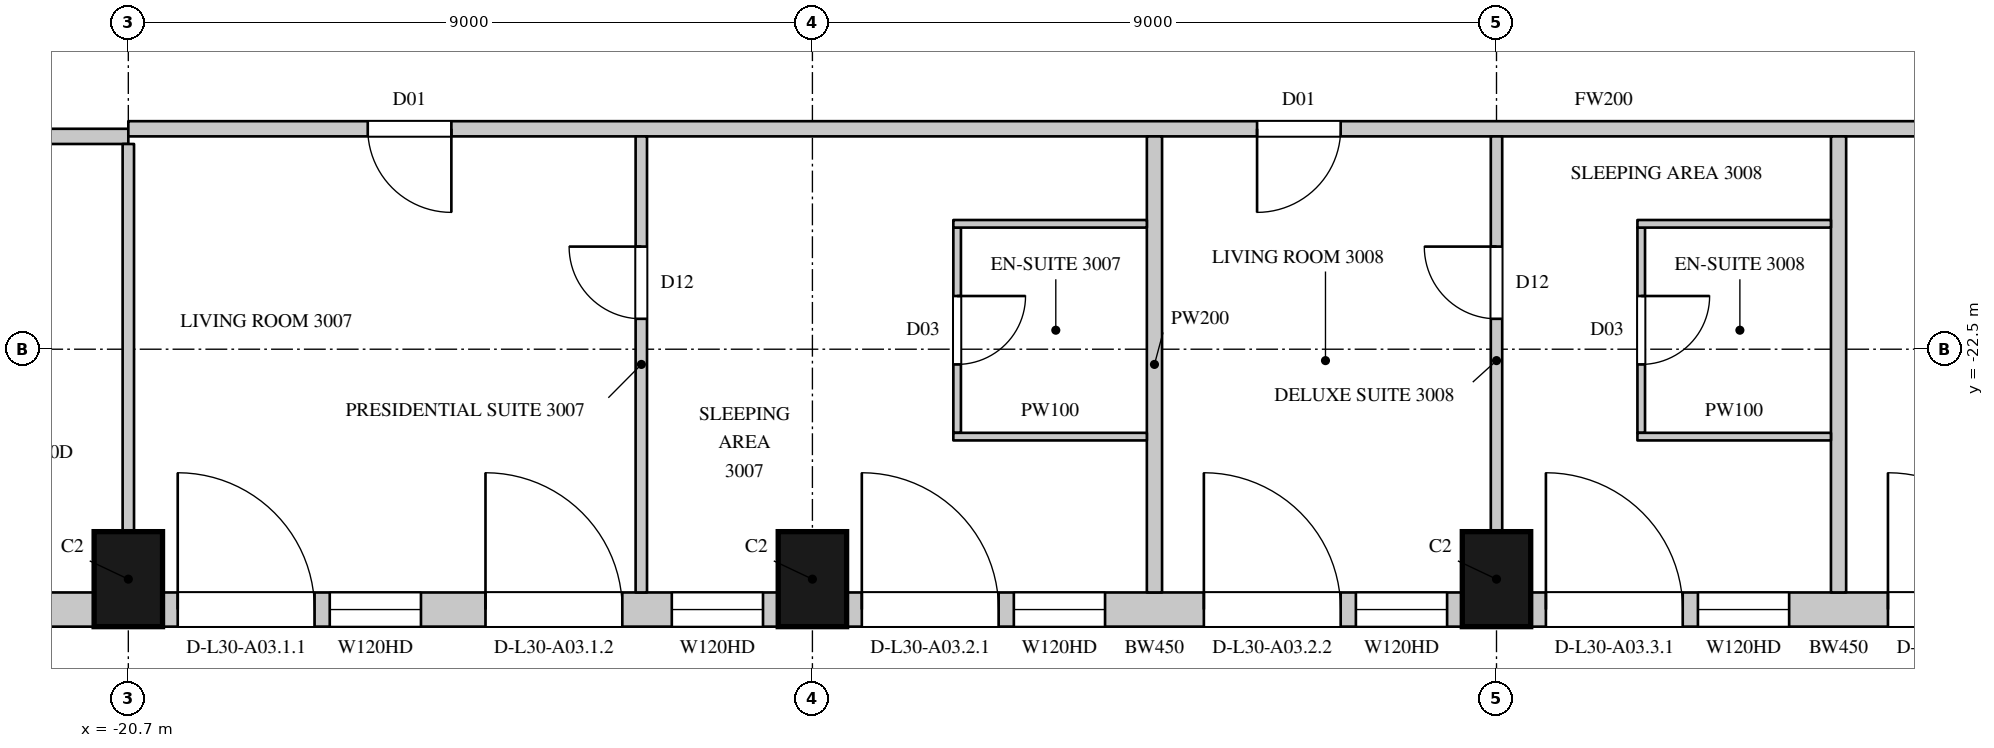
"""IFC4 building model, lengths in metres.
Left out: names, types, materials, properties, quantities, classifications, styles, units other than length and angle.
Written with IfcOpenShell. Run it as: python <this file> out.ifc"""

import sys

from ifc_helpers import new_model, si_unit, direction, frame, frame_2d, origin, origin_2d, place, context, subcontext, project, spatial, rectangle, extrude, element, fill, save


model = new_model("IFC4")
c1 = context("Model", 3, precision=1e-05, world=origin(), true_north=direction((0.0, 1.0)))
c2 = subcontext(c1, "Body", "Model", "MODEL_VIEW")
j1 = project(units=[si_unit("LENGTHUNIT", "METRE"), si_unit("PLANEANGLEUNIT", "RADIAN")], contexts=[c1])
p1 = place(None, origin())
s1 = spatial("IfcSite", under=j1, at=p1, CompositionType="ELEMENT")
p2 = place(p1, origin())
s2 = spatial("IfcBuilding", under=s1, at=p2, CompositionType="ELEMENT")
p3 = place(p2, frame((0.0, 0.0, 138.3)))
s3 = spatial("IfcBuildingStorey", under=s2, at=p3, CompositionType="ELEMENT", Elevation=138.3)
for number, where, z_axis, x_axis in (
    (1, (-20.7, -25.525, 0.0), (0.0, 0.0, 1.0), (1.0, 0.0, 0.0)),
    (2, (-11.7, -25.525, 0.0), (0.0, 0.0, 1.0), (1.0, 0.0, 0.0)),
    (3, (-2.7, -25.525, 0.0), (0.0, 0.0, 1.0), (1.0, 0.0, 0.0)),
):
    element("IfcColumn", number, at=place(p3, frame(where, z_axis=z_axis, x_axis=x_axis)), inside=s3, PredefinedType="COLUMN", context=c2, shape_type="SweptSolid", body=[
        extrude(rectangle(XDim=0.9, YDim=1.25, at=origin_2d()), origin(), (0.0, 0.0, 1.0), 3.6),
    ])
p4 = place(p3, frame((-24.064, -25.925, 0.0), z_axis=(0.0, 0.0, 1.0), x_axis=(1.0, 0.0, 0.0)))
e4 = element("IfcWall", 4, at=p4, inside=s3, PredefinedType="SOLIDWALL", context=c2, shape_type="SweptSolid", body=[
    extrude(rectangle(XDim=2.914, YDim=0.45, at=frame_2d((1.457, 0.0))), origin(), (0.0, 0.0, 1.0), 3.3),
])
p5 = place(p3, frame((-20.25, -25.925, 0.0), z_axis=(0.0, 0.0, 1.0), x_axis=(1.0, 0.0, 0.0)))
e5 = element("IfcWall", 5, at=p5, inside=s3, PredefinedType="SOLIDWALL", context=c2, shape_type="SweptSolid", body=[
    extrude(rectangle(XDim=8.1, YDim=0.45, at=frame_2d((4.05, 0.0))), origin(), (0.0, 0.0, 1.0), 3.3),
])
p6 = place(p5, frame((0.2, 0.0, 0.0)))
e6 = element("IfcOpeningElement", 6, at=p6, cuts=e5, PredefinedType="OPENING", context=c2, shape_type="SweptSolid", body=[
    extrude(rectangle(XDim=1.8, YDim=2.4, at=frame_2d((0.9, 1.2))), frame((0.0, 0.235, 0.0), z_axis=(0.0, -1.0, 0.0), x_axis=(1.0, 0.0, 0.0)), (0.0, 0.0, 1.0), 0.47),
])
p7 = place(p5, frame((2.2, 0.0, 1.05)))
e7 = element("IfcOpeningElement", 7, at=p7, cuts=e5, PredefinedType="OPENING", context=c2, shape_type="SweptSolid", body=[
    extrude(rectangle(XDim=1.2, YDim=2.0, at=frame_2d((0.6, 1.0))), frame((0.0, 0.235, 0.0), z_axis=(0.0, -1.0, 0.0), x_axis=(1.0, 0.0, 0.0)), (0.0, 0.0, 1.0), 0.47),
])
p8 = place(p5, frame((4.249, 0.0, 0.0)))
e8 = element("IfcOpeningElement", 8, at=p8, cuts=e5, PredefinedType="OPENING", context=c2, shape_type="SweptSolid", body=[
    extrude(rectangle(XDim=1.8, YDim=2.4, at=frame_2d((0.9, 1.2))), frame((0.0, 0.235, 0.0), z_axis=(0.0, -1.0, 0.0), x_axis=(1.0, 0.0, 0.0)), (0.0, 0.0, 1.0), 0.47),
])
p9 = place(p5, frame((6.7, 0.0, 1.05)))
e9 = element("IfcOpeningElement", 9, at=p9, cuts=e5, PredefinedType="OPENING", context=c2, shape_type="SweptSolid", body=[
    extrude(rectangle(XDim=1.2, YDim=2.0, at=frame_2d((0.6, 1.0))), frame((0.0, 0.235, 0.0), z_axis=(0.0, -1.0, 0.0), x_axis=(1.0, 0.0, 0.0)), (0.0, 0.0, 1.0), 0.47),
])
p10 = place(p3, frame((-11.25, -25.925, 0.0), z_axis=(0.0, 0.0, 1.0), x_axis=(1.0, 0.0, 0.0)))
e10 = element("IfcWall", 10, at=p10, inside=s3, PredefinedType="SOLIDWALL", context=c2, shape_type="SweptSolid", body=[
    extrude(rectangle(XDim=8.1, YDim=0.45, at=frame_2d((4.05, 0.0))), origin(), (0.0, 0.0, 1.0), 3.3),
])
p11 = place(p10, frame((0.2, 0.0, 0.0)))
e11 = element("IfcOpeningElement", 11, at=p11, cuts=e10, PredefinedType="OPENING", context=c2, shape_type="SweptSolid", body=[
    extrude(rectangle(XDim=1.8, YDim=2.4, at=frame_2d((0.9, 1.2))), frame((0.0, 0.235, 0.0), z_axis=(0.0, -1.0, 0.0), x_axis=(1.0, 0.0, 0.0)), (0.0, 0.0, 1.0), 0.47),
])
p12 = place(p10, frame((2.2, 0.0, 1.05)))
e12 = element("IfcOpeningElement", 12, at=p12, cuts=e10, PredefinedType="OPENING", context=c2, shape_type="SweptSolid", body=[
    extrude(rectangle(XDim=1.2, YDim=2.0, at=frame_2d((0.6, 1.0))), frame((0.0, 0.235, 0.0), z_axis=(0.0, -1.0, 0.0), x_axis=(1.0, 0.0, 0.0)), (0.0, 0.0, 1.0), 0.47),
])
p13 = place(p10, frame((4.7, 0.0, 0.0)))
e13 = element("IfcOpeningElement", 13, at=p13, cuts=e10, PredefinedType="OPENING", context=c2, shape_type="SweptSolid", body=[
    extrude(rectangle(XDim=1.8, YDim=2.4, at=frame_2d((0.9, 1.2))), frame((0.0, 0.235, 0.0), z_axis=(0.0, -1.0, 0.0), x_axis=(1.0, 0.0, 0.0)), (0.0, 0.0, 1.0), 0.47),
])
p14 = place(p10, frame((6.7, 0.0, 1.05)))
e14 = element("IfcOpeningElement", 14, at=p14, cuts=e10, PredefinedType="OPENING", context=c2, shape_type="SweptSolid", body=[
    extrude(rectangle(XDim=1.2, YDim=2.0, at=frame_2d((0.6, 1.0))), frame((0.0, 0.235, 0.0), z_axis=(0.0, -1.0, 0.0), x_axis=(1.0, 0.0, 0.0)), (0.0, 0.0, 1.0), 0.47),
])
p15 = place(p3, frame((-2.25, -25.925, 0.0), z_axis=(0.0, 0.0, 1.0), x_axis=(1.0, 0.0, 0.0)))
e15 = element("IfcWall", 15, at=p15, inside=s3, PredefinedType="SOLIDWALL", context=c2, shape_type="SweptSolid", body=[
    extrude(rectangle(XDim=8.1, YDim=0.45, at=frame_2d((4.05, 0.0))), origin(), (0.0, 0.0, 1.0), 3.3),
])
p16 = place(p15, frame((0.2, 0.0, 0.0)))
e16 = element("IfcOpeningElement", 16, at=p16, cuts=e15, PredefinedType="OPENING", context=c2, shape_type="SweptSolid", body=[
    extrude(rectangle(XDim=1.8, YDim=2.4, at=frame_2d((0.9, 1.2))), frame((0.0, 0.235, 0.0), z_axis=(0.0, -1.0, 0.0), x_axis=(1.0, 0.0, 0.0)), (0.0, 0.0, 1.0), 0.47),
])
p17 = place(p15, frame((2.2, 0.0, 1.05)))
e17 = element("IfcOpeningElement", 17, at=p17, cuts=e15, PredefinedType="OPENING", context=c2, shape_type="SweptSolid", body=[
    extrude(rectangle(XDim=1.2, YDim=2.0, at=frame_2d((0.6, 1.0))), frame((0.0, 0.235, 0.0), z_axis=(0.0, -1.0, 0.0), x_axis=(1.0, 0.0, 0.0)), (0.0, 0.0, 1.0), 0.47),
])
p18 = place(p15, frame((4.7, 0.0, 0.0)))
e18 = element("IfcOpeningElement", 18, at=p18, cuts=e15, PredefinedType="OPENING", context=c2, shape_type="SweptSolid", body=[
    extrude(rectangle(XDim=1.8, YDim=2.4, at=frame_2d((0.9, 1.2))), frame((0.0, 0.235, 0.0), z_axis=(0.0, -1.0, 0.0), x_axis=(1.0, 0.0, 0.0)), (0.0, 0.0, 1.0), 0.47),
])
p19 = place(p15, frame((6.7, 0.0, 1.05)))
e19 = element("IfcOpeningElement", 19, at=p19, cuts=e15, PredefinedType="OPENING", context=c2, shape_type="SweptSolid", body=[
    extrude(rectangle(XDim=1.2, YDim=2.0, at=frame_2d((0.6, 1.0))), frame((0.0, 0.235, 0.0), z_axis=(0.0, -1.0, 0.0), x_axis=(1.0, 0.0, 0.0)), (0.0, 0.0, 1.0), 0.47),
])
p20 = place(p3, frame((-23.752, -19.7, 0.0), z_axis=(0.0, 0.0, 1.0), x_axis=(1.0, 0.0, 0.0)))
e20 = element("IfcWall", 20, at=p20, inside=s3, PredefinedType="PARTITIONING", context=c2, shape_type="SweptSolid", body=[
    extrude(rectangle(XDim=3.052, YDim=0.2, at=frame_2d((1.526, 0.0))), origin(), (0.0, 0.0, 1.0), 3.3),
])
p21 = place(p20, frame((0.85, 0.0, 0.0)))
e21 = element("IfcOpeningElement", 21, at=p21, cuts=e20, PredefinedType="OPENING", context=c2, shape_type="SweptSolid", body=[
    extrude(rectangle(XDim=0.9, YDim=2.2, at=frame_2d((0.45, 1.1))), frame((0.0, 0.11, 0.0), z_axis=(0.0, -1.0, 0.0), x_axis=(1.0, 0.0, 0.0)), (0.0, 0.0, 1.0), 0.22),
])
p22 = place(p3, frame((-20.7, -19.6, 0.0), z_axis=(0.0, 0.0, 1.0), x_axis=(1.0, 0.0, 0.0)))
e22 = element("IfcWall", 22, at=p22, inside=s3, PredefinedType="PARTITIONING", context=c2, shape_type="SweptSolid", body=[
    extrude(rectangle(XDim=38.825, YDim=0.2, at=frame_2d((19.413, 0.0))), origin(), (0.0, 0.0, 1.0), 3.3),
])
p23 = place(p22, frame((3.15, 0.0, 0.0)))
e23 = element("IfcOpeningElement", 23, at=p23, cuts=e22, PredefinedType="OPENING", context=c2, shape_type="SweptSolid", body=[
    extrude(rectangle(XDim=1.1, YDim=2.4, at=frame_2d((0.55, 1.2))), frame((0.0, 0.11, 0.0), z_axis=(0.0, -1.0, 0.0), x_axis=(1.0, 0.0, 0.0)), (0.0, 0.0, 1.0), 0.22),
])
p24 = place(p22, frame((14.85, 0.0, 0.0)))
e24 = element("IfcOpeningElement", 24, at=p24, cuts=e22, PredefinedType="OPENING", context=c2, shape_type="SweptSolid", body=[
    extrude(rectangle(XDim=1.1, YDim=2.4, at=frame_2d((0.55, 1.2))), frame((0.0, 0.11, 0.0), z_axis=(0.0, -1.0, 0.0), x_axis=(1.0, 0.0, 0.0)), (0.0, 0.0, 1.0), 0.22),
])
p25 = place(p22, frame((23.85, 0.0, 0.0)))
e25 = element("IfcOpeningElement", 25, at=p25, cuts=e22, PredefinedType="OPENING", context=c2, shape_type="SweptSolid", body=[
    extrude(rectangle(XDim=1.1, YDim=2.4, at=frame_2d((0.55, 1.2))), frame((0.0, 0.11, 0.0), z_axis=(0.0, -1.0, 0.0), x_axis=(1.0, 0.0, 0.0)), (0.0, 0.0, 1.0), 0.22),
])
p26 = place(p22, frame((37.3, 0.0, 0.0)))
e26 = element("IfcOpeningElement", 26, at=p26, cuts=e22, PredefinedType="OPENING", context=c2, shape_type="SweptSolid", body=[
    extrude(rectangle(XDim=0.95, YDim=2.2, at=frame_2d((0.475, 1.1))), frame((0.0, 0.11, 0.0), z_axis=(0.0, -1.0, 0.0), x_axis=(1.0, 0.0, 0.0)), (0.0, 0.0, 1.0), 0.22),
])
p27 = place(p3, frame((-20.7, -24.9, 0.0), z_axis=(0.0, 0.0, 1.0), x_axis=(0.0, 1.0, 0.0)))
e27 = element("IfcWall", 27, at=p27, inside=s3, PredefinedType="PARTITIONING", context=c2, shape_type="SweptSolid", body=[
    extrude(rectangle(XDim=5.1, YDim=0.15, at=frame_2d((2.55, 0.0))), origin(), (0.0, 0.0, 1.0), 2.75),
])
p28 = place(p3, frame((-13.951, -25.7, 0.0), z_axis=(0.0, 0.0, 1.0), x_axis=(0.0, 1.0, 0.0)))
e28 = element("IfcWall", 28, at=p28, inside=s3, PredefinedType="PARTITIONING", context=c2, shape_type="SweptSolid", body=[
    extrude(rectangle(XDim=6.0, YDim=0.15, at=frame_2d((3.0, 0.0))), origin(), (0.0, 0.0, 1.0), 3.3),
])
p29 = place(p28, frame((3.6, 0.0, 0.0)))
e29 = element("IfcOpeningElement", 29, at=p29, cuts=e28, PredefinedType="OPENING", context=c2, shape_type="SweptSolid", body=[
    extrude(rectangle(XDim=0.95, YDim=2.2, at=frame_2d((0.475, 1.1))), frame((0.0, 0.085, 0.0), z_axis=(0.0, -1.0, 0.0), x_axis=(1.0, 0.0, 0.0)), (0.0, 0.0, 1.0), 0.17),
])
p30 = place(p3, frame((-2.7, -24.9, 0.0), z_axis=(0.0, 0.0, 1.0), x_axis=(0.0, 1.0, 0.0)))
e30 = element("IfcWall", 30, at=p30, inside=s3, PredefinedType="PARTITIONING", context=c2, shape_type="SweptSolid", body=[
    extrude(rectangle(XDim=5.2, YDim=0.15, at=frame_2d((2.6, 0.0))), origin(), (0.0, 0.0, 1.0), 2.75),
])
p31 = place(p30, frame((2.8, 0.0, 0.0)))
e31 = element("IfcOpeningElement", 31, at=p31, cuts=e30, PredefinedType="OPENING", context=c2, shape_type="SweptSolid", body=[
    extrude(rectangle(XDim=0.95, YDim=2.2, at=frame_2d((0.475, 1.1))), frame((0.0, 0.085, 0.0), z_axis=(0.0, -1.0, 0.0), x_axis=(1.0, 0.0, 0.0)), (0.0, 0.0, 1.0), 0.17),
])
for number, where, z_axis, x_axis in (
    (32, (-7.2, -25.7, 0.0), (0.0, 0.0, 1.0), (0.0, 1.0, 0.0)),
    (33, (1.8, -25.7, 0.0), (0.0, 0.0, 1.0), (0.0, 1.0, 0.0)),
):
    element("IfcWall", number, at=place(p3, frame(where, z_axis=z_axis, x_axis=x_axis)), inside=s3, PredefinedType="PARTITIONING", context=c2, shape_type="SweptSolid", body=[
        extrude(rectangle(XDim=6.0, YDim=0.2, at=frame_2d((3.0, 0.0))), origin(), (0.0, 0.0, 1.0), 2.65),
    ])
p32 = place(p3, frame((-9.796, -23.6, 0.0), z_axis=(0.0, 0.0, 1.0), x_axis=(0.0, 1.0, 0.0)))
e34 = element("IfcWall", 34, at=p32, inside=s3, PredefinedType="PARTITIONING", context=c2, shape_type="SweptSolid", body=[
    extrude(rectangle(XDim=2.7, YDim=0.1, at=frame_2d((1.35, 0.0))), origin(), (0.0, 0.0, 1.0), 3.3),
])
p33 = place(p32, frame((0.9, 0.0, 0.0)))
e35 = element("IfcOpeningElement", 35, at=p33, cuts=e34, PredefinedType="OPENING", context=c2, shape_type="SweptSolid", body=[
    extrude(rectangle(XDim=0.9, YDim=2.2, at=frame_2d((0.45, 1.1))), frame((0.0, 0.06, 0.0), z_axis=(0.0, -1.0, 0.0), x_axis=(1.0, 0.0, 0.0)), (0.0, 0.0, 1.0), 0.12),
])
for number, where, z_axis, x_axis in (
    (36, (-9.846, -23.65, 0.0), (0.0, 0.0, 1.0), (1.0, 0.0, 0.0)),
    (37, (-9.846, -20.85, 0.0), (0.0, 0.0, 1.0), (1.0, 0.0, 0.0)),
):
    element("IfcWall", number, at=place(p3, frame(where, z_axis=z_axis, x_axis=x_axis)), inside=s3, PredefinedType="PARTITIONING", context=c2, shape_type="SweptSolid", body=[
        extrude(rectangle(XDim=2.546, YDim=0.1, at=frame_2d((1.273, 0.0))), origin(), (0.0, 0.0, 1.0), 3.3),
    ])
p34 = place(p3, frame((-0.796, -23.6, 0.0), z_axis=(0.0, 0.0, 1.0), x_axis=(0.0, 1.0, 0.0)))
e38 = element("IfcWall", 38, at=p34, inside=s3, PredefinedType="PARTITIONING", context=c2, shape_type="SweptSolid", body=[
    extrude(rectangle(XDim=2.7, YDim=0.1, at=frame_2d((1.35, 0.0))), origin(), (0.0, 0.0, 1.0), 3.3),
])
p35 = place(p34, frame((0.9, 0.0, 0.0)))
e39 = element("IfcOpeningElement", 39, at=p35, cuts=e38, PredefinedType="OPENING", context=c2, shape_type="SweptSolid", body=[
    extrude(rectangle(XDim=0.9, YDim=2.2, at=frame_2d((0.45, 1.1))), frame((0.0, 0.06, 0.0), z_axis=(0.0, -1.0, 0.0), x_axis=(1.0, 0.0, 0.0)), (0.0, 0.0, 1.0), 0.12),
])
for number, where, z_axis, x_axis in (
    (40, (-0.846, -23.65, 0.0), (0.0, 0.0, 1.0), (1.0, 0.0, 0.0)),
    (41, (-0.846, -20.85, 0.0), (0.0, 0.0, 1.0), (1.0, 0.0, 0.0)),
):
    element("IfcWall", number, at=place(p3, frame(where, z_axis=z_axis, x_axis=x_axis)), inside=s3, PredefinedType="PARTITIONING", context=c2, shape_type="SweptSolid", body=[
        extrude(rectangle(XDim=2.546, YDim=0.1, at=frame_2d((1.273, 0.0))), origin(), (0.0, 0.0, 1.0), 3.3),
    ])
p36 = place(p6, origin())
e42 = element("IfcDoor", 42, at=p36, inside=s3, OperationType="SLIDING_TO_LEFT", PredefinedType="DOOR", context=c2, shape_type="SweptSolid", body=[
    extrude(rectangle(XDim=1.8, YDim=2.4, at=frame_2d((0.9, 1.2))), frame((0.0, 0.13, 0.0), z_axis=(0.0, -1.0, 0.0), x_axis=(1.0, 0.0, 0.0)), (0.0, 0.0, 1.0), 0.05),
])
fill(e6, e42)
p37 = place(p7, origin())
e43 = element("IfcWindow", 43, at=p37, inside=s3, PartitioningType="SINGLE_PANEL", PredefinedType="WINDOW", context=c2, shape_type="SweptSolid", body=[
    extrude(rectangle(XDim=1.2, YDim=2.0, at=frame_2d((0.6, 1.0))), frame((0.0, 0.135, 0.0), z_axis=(0.0, -1.0, 0.0), x_axis=(1.0, 0.0, 0.0)), (0.0, 0.0, 1.0), 0.06),
])
fill(e7, e43)
p38 = place(p8, origin())
e44 = element("IfcDoor", 44, at=p38, inside=s3, OperationType="SLIDING_TO_LEFT", PredefinedType="DOOR", context=c2, shape_type="SweptSolid", body=[
    extrude(rectangle(XDim=1.8, YDim=2.4, at=frame_2d((0.9, 1.2))), frame((0.0, 0.13, 0.0), z_axis=(0.0, -1.0, 0.0), x_axis=(1.0, 0.0, 0.0)), (0.0, 0.0, 1.0), 0.05),
])
fill(e8, e44)
p39 = place(p9, origin())
e45 = element("IfcWindow", 45, at=p39, inside=s3, PartitioningType="SINGLE_PANEL", PredefinedType="WINDOW", context=c2, shape_type="SweptSolid", body=[
    extrude(rectangle(XDim=1.2, YDim=2.0, at=frame_2d((0.6, 1.0))), frame((0.0, 0.135, 0.0), z_axis=(0.0, -1.0, 0.0), x_axis=(1.0, 0.0, 0.0)), (0.0, 0.0, 1.0), 0.06),
])
fill(e9, e45)
p40 = place(p11, origin())
e46 = element("IfcDoor", 46, at=p40, inside=s3, OperationType="SLIDING_TO_LEFT", PredefinedType="DOOR", context=c2, shape_type="SweptSolid", body=[
    extrude(rectangle(XDim=1.8, YDim=2.4, at=frame_2d((0.9, 1.2))), frame((0.0, 0.13, 0.0), z_axis=(0.0, -1.0, 0.0), x_axis=(1.0, 0.0, 0.0)), (0.0, 0.0, 1.0), 0.05),
])
fill(e11, e46)
p41 = place(p12, origin())
e47 = element("IfcWindow", 47, at=p41, inside=s3, PartitioningType="SINGLE_PANEL", PredefinedType="WINDOW", context=c2, shape_type="SweptSolid", body=[
    extrude(rectangle(XDim=1.2, YDim=2.0, at=frame_2d((0.6, 1.0))), frame((0.0, 0.135, 0.0), z_axis=(0.0, -1.0, 0.0), x_axis=(1.0, 0.0, 0.0)), (0.0, 0.0, 1.0), 0.06),
])
fill(e12, e47)
p42 = place(p13, origin())
e48 = element("IfcDoor", 48, at=p42, inside=s3, OperationType="SLIDING_TO_LEFT", PredefinedType="DOOR", context=c2, shape_type="SweptSolid", body=[
    extrude(rectangle(XDim=1.8, YDim=2.4, at=frame_2d((0.9, 1.2))), frame((0.0, 0.13, 0.0), z_axis=(0.0, -1.0, 0.0), x_axis=(1.0, 0.0, 0.0)), (0.0, 0.0, 1.0), 0.05),
])
fill(e13, e48)
p43 = place(p14, origin())
e49 = element("IfcWindow", 49, at=p43, inside=s3, PartitioningType="SINGLE_PANEL", PredefinedType="WINDOW", context=c2, shape_type="SweptSolid", body=[
    extrude(rectangle(XDim=1.2, YDim=2.0, at=frame_2d((0.6, 1.0))), frame((0.0, 0.135, 0.0), z_axis=(0.0, -1.0, 0.0), x_axis=(1.0, 0.0, 0.0)), (0.0, 0.0, 1.0), 0.06),
])
fill(e14, e49)
p44 = place(p16, origin())
e50 = element("IfcDoor", 50, at=p44, inside=s3, OperationType="SLIDING_TO_LEFT", PredefinedType="DOOR", context=c2, shape_type="SweptSolid", body=[
    extrude(rectangle(XDim=1.8, YDim=2.4, at=frame_2d((0.9, 1.2))), frame((0.0, 0.13, 0.0), z_axis=(0.0, -1.0, 0.0), x_axis=(1.0, 0.0, 0.0)), (0.0, 0.0, 1.0), 0.05),
])
fill(e16, e50)
p45 = place(p17, origin())
e51 = element("IfcWindow", 51, at=p45, inside=s3, PartitioningType="SINGLE_PANEL", PredefinedType="WINDOW", context=c2, shape_type="SweptSolid", body=[
    extrude(rectangle(XDim=1.2, YDim=2.0, at=frame_2d((0.6, 1.0))), frame((0.0, 0.135, 0.0), z_axis=(0.0, -1.0, 0.0), x_axis=(1.0, 0.0, 0.0)), (0.0, 0.0, 1.0), 0.06),
])
fill(e17, e51)
p46 = place(p18, origin())
e52 = element("IfcDoor", 52, at=p46, inside=s3, OperationType="SLIDING_TO_LEFT", PredefinedType="DOOR", context=c2, shape_type="SweptSolid", body=[
    extrude(rectangle(XDim=1.8, YDim=2.4, at=frame_2d((0.9, 1.2))), frame((0.0, 0.13, 0.0), z_axis=(0.0, -1.0, 0.0), x_axis=(1.0, 0.0, 0.0)), (0.0, 0.0, 1.0), 0.05),
])
fill(e18, e52)
p47 = place(p23, origin())
e53 = element("IfcDoor", 53, at=p47, inside=s3, OperationType="SINGLE_SWING_LEFT", PredefinedType="DOOR", context=c2, shape_type="SweptSolid", body=[
    extrude(rectangle(XDim=1.1, YDim=2.4, at=frame_2d((0.55, 1.2))), frame((0.0, 0.025, 0.0), z_axis=(0.0, -1.0, 0.0), x_axis=(1.0, 0.0, 0.0)), (0.0, 0.0, 1.0), 0.05),
])
fill(e23, e53)
p48 = place(p29, origin())
e54 = element("IfcDoor", 54, at=p48, inside=s3, OperationType="SINGLE_SWING_RIGHT", PredefinedType="DOOR", context=c2, shape_type="SweptSolid", body=[
    extrude(rectangle(XDim=0.95, YDim=2.2, at=frame_2d((0.475, 1.1))), frame((0.0, 0.025, 0.0), z_axis=(0.0, -1.0, 0.0), x_axis=(1.0, 0.0, 0.0)), (0.0, 0.0, 1.0), 0.05),
])
fill(e29, e54)
p49 = place(p33, origin())
e55 = element("IfcDoor", 55, at=p49, inside=s3, OperationType="SINGLE_SWING_LEFT", PredefinedType="DOOR", context=c2, shape_type="SweptSolid", body=[
    extrude(rectangle(XDim=0.9, YDim=2.2, at=frame_2d((0.45, 1.1))), frame((0.0, 0.025, 0.0), z_axis=(0.0, -1.0, 0.0), x_axis=(1.0, 0.0, 0.0)), (0.0, 0.0, 1.0), 0.05),
])
fill(e35, e55)
p50 = place(p24, origin())
e56 = element("IfcDoor", 56, at=p50, inside=s3, OperationType="SINGLE_SWING_RIGHT", PredefinedType="DOOR", context=c2, shape_type="SweptSolid", body=[
    extrude(rectangle(XDim=1.1, YDim=2.4, at=frame_2d((0.55, 1.2))), frame((0.0, 0.025, 0.0), z_axis=(0.0, -1.0, 0.0), x_axis=(1.0, 0.0, 0.0)), (0.0, 0.0, 1.0), 0.05),
])
fill(e24, e56)
p51 = place(p31, origin())
e57 = element("IfcDoor", 57, at=p51, inside=s3, OperationType="SINGLE_SWING_RIGHT", PredefinedType="DOOR", context=c2, shape_type="SweptSolid", body=[
    extrude(rectangle(XDim=0.95, YDim=2.2, at=frame_2d((0.475, 1.1))), frame((0.0, 0.025, 0.0), z_axis=(0.0, -1.0, 0.0), x_axis=(1.0, 0.0, 0.0)), (0.0, 0.0, 1.0), 0.05),
])
fill(e31, e57)
p52 = place(p35, origin())
e58 = element("IfcDoor", 58, at=p52, inside=s3, OperationType="SINGLE_SWING_LEFT", PredefinedType="DOOR", context=c2, shape_type="SweptSolid", body=[
    extrude(rectangle(XDim=0.9, YDim=2.2, at=frame_2d((0.45, 1.1))), frame((0.0, 0.025, 0.0), z_axis=(0.0, -1.0, 0.0), x_axis=(1.0, 0.0, 0.0)), (0.0, 0.0, 1.0), 0.05),
])
fill(e39, e58)
save(model, sys.argv[1])
